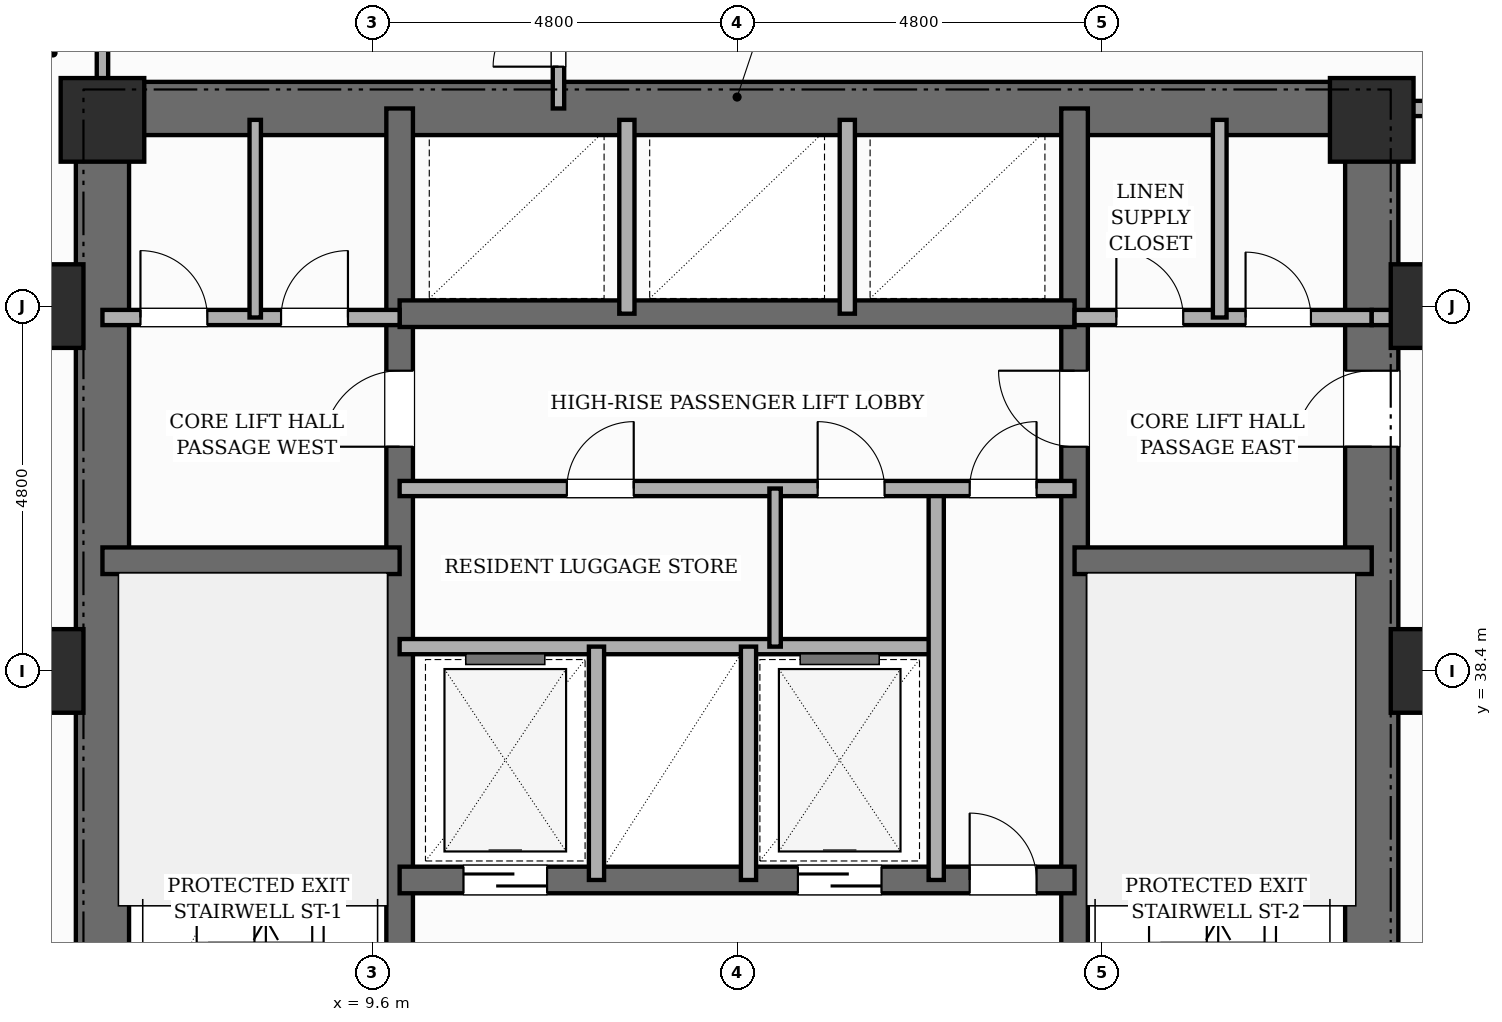
"""IFC4 building model, lengths in metres.
Left out: names, types, materials, properties, quantities, classifications, styles, units other than length and angle.
Written with IfcOpenShell. Run it as: python <this file> out.ifc"""

import sys

from ifc_helpers import new_model, si_unit, direction, frame, frame_2d, origin, origin_2d, place, context, subcontext, project, spatial, rectangle, extrude, element, fill, save


model = new_model("IFC4")
c1 = context("Model", 3, precision=1e-05, world=origin(), true_north=direction((0.0, 1.0)))
c2 = subcontext(c1, "Body", "Model", "MODEL_VIEW")
j1 = project(units=[si_unit("LENGTHUNIT", "METRE"), si_unit("PLANEANGLEUNIT", "RADIAN")], contexts=[c1])
p1 = place(None, origin())
s1 = spatial("IfcSite", under=j1, at=p1, CompositionType="ELEMENT")
p2 = place(p1, origin())
s2 = spatial("IfcBuilding", under=s1, at=p2, CompositionType="ELEMENT")
p3 = place(p2, frame((0.0, 0.0, 57.4)))
s3 = spatial("IfcBuildingStorey", under=s2, at=p3, CompositionType="ELEMENT", Elevation=57.4)
p4 = place(p3, frame((6.05, 30.55, 0.0), z_axis=(0.0, 0.0, 1.0), x_axis=(0.0, 1.0, 0.0)))
e1 = element("IfcWall", 1, at=p4, inside=s3, PredefinedType="SHEAR", context=c2, shape_type="SweptSolid", body=[
    extrude(rectangle(XDim=15.6, YDim=0.7, at=frame_2d((7.8, 0.0))), origin(), (0.0, 0.0, 1.0), 3.6),
])
p5 = place(p3, frame((22.75, 30.55, 0.0), z_axis=(0.0, 0.0, 1.0), x_axis=(0.0, 1.0, 0.0)))
e2 = element("IfcWall", 2, at=p5, inside=s3, PredefinedType="SHEAR", context=c2, shape_type="SweptSolid", body=[
    extrude(rectangle(XDim=15.6, YDim=0.7, at=frame_2d((7.8, 0.0))), origin(), (0.0, 0.0, 1.0), 3.6),
])
p6 = place(p5, frame((10.8, 0.0, 0.0)))
e3 = element("IfcOpeningElement", 3, at=p6, cuts=e2, PredefinedType="OPENING", context=c2, shape_type="SweptSolid", body=[
    extrude(rectangle(XDim=1.0, YDim=2.15, at=frame_2d((0.5, 1.075))), frame((0.0, 0.36, 0.0), z_axis=(0.0, -1.0, 0.0), x_axis=(1.0, 0.0, 0.0)), (0.0, 0.0, 1.0), 0.72),
])
p7 = place(p3, frame((6.05, 45.8, 0.0), z_axis=(0.0, 0.0, 1.0), x_axis=(1.0, 0.0, 0.0)))
e4 = element("IfcWall", 4, at=p7, inside=s3, PredefinedType="SHEAR", context=c2, shape_type="SweptSolid", body=[
    extrude(rectangle(XDim=16.7, YDim=0.7, at=frame_2d((8.35, 0.0))), origin(), (0.0, 0.0, 1.0), 3.6),
])
p8 = place(p3, frame((9.96, 30.9, 0.0), z_axis=(0.0, 0.0, 1.0), x_axis=(0.0, 1.0, 0.0)))
e5 = element("IfcWall", 5, at=p8, inside=s3, PredefinedType="SHEAR", context=c2, shape_type="SweptSolid", body=[
    extrude(rectangle(XDim=14.9, YDim=0.35, at=frame_2d((7.45, 0.0))), origin(), (0.0, 0.0, 1.0), 3.6),
])
p9 = place(p8, frame((0.65, 0.0, 0.0)))
e6 = element("IfcOpeningElement", 6, at=p9, cuts=e5, PredefinedType="OPENING", context=c2, shape_type="SweptSolid", body=[
    extrude(rectangle(XDim=0.95, YDim=2.1, at=frame_2d((0.475, 1.05))), frame((0.0, 0.185, 0.0), z_axis=(0.0, -1.0, 0.0), x_axis=(1.0, 0.0, 0.0)), (0.0, 0.0, 1.0), 0.37),
])
p10 = place(p8, frame((10.45, 0.0, 0.0)))
e7 = element("IfcOpeningElement", 7, at=p10, cuts=e5, PredefinedType="OPENING", context=c2, shape_type="SweptSolid", body=[
    extrude(rectangle(XDim=1.0, YDim=2.15, at=frame_2d((0.5, 1.075))), frame((0.0, 0.185, 0.0), z_axis=(0.0, -1.0, 0.0), x_axis=(1.0, 0.0, 0.0)), (0.0, 0.0, 1.0), 0.37),
])
p11 = place(p3, frame((18.84, 30.9, 0.0), z_axis=(0.0, 0.0, 1.0), x_axis=(0.0, 1.0, 0.0)))
e8 = element("IfcWall", 8, at=p11, inside=s3, PredefinedType="SHEAR", context=c2, shape_type="SweptSolid", body=[
    extrude(rectangle(XDim=14.9, YDim=0.35, at=frame_2d((7.45, 0.0))), origin(), (0.0, 0.0, 1.0), 3.6),
])
p12 = place(p11, frame((0.65, 0.0, 0.0)))
e9 = element("IfcOpeningElement", 9, at=p12, cuts=e8, PredefinedType="OPENING", context=c2, shape_type="SweptSolid", body=[
    extrude(rectangle(XDim=0.95, YDim=2.1, at=frame_2d((0.475, 1.05))), frame((0.0, 0.185, 0.0), z_axis=(0.0, -1.0, 0.0), x_axis=(1.0, 0.0, 0.0)), (0.0, 0.0, 1.0), 0.37),
])
p13 = place(p11, frame((10.45, 0.0, 0.0)))
e10 = element("IfcOpeningElement", 10, at=p13, cuts=e8, PredefinedType="OPENING", context=c2, shape_type="SweptSolid", body=[
    extrude(rectangle(XDim=1.0, YDim=2.15, at=frame_2d((0.5, 1.075))), frame((0.0, 0.185, 0.0), z_axis=(0.0, -1.0, 0.0), x_axis=(1.0, 0.0, 0.0)), (0.0, 0.0, 1.0), 0.37),
])
for number, where, z_axis, x_axis in (
    (11, (6.05, 39.85, 0.0), (0.0, 0.0, 1.0), (1.0, 0.0, 0.0)),
    (12, (18.84, 39.85, 0.0), (0.0, 0.0, 1.0), (1.0, 0.0, 0.0)),
):
    element("IfcWall", number, at=place(p3, frame(where, z_axis=z_axis, x_axis=x_axis)), inside=s3, PredefinedType="SHEAR", context=c2, shape_type="SweptSolid", body=[
        extrude(rectangle(XDim=3.91, YDim=0.35, at=frame_2d((1.955, 0.0))), origin(), (0.0, 0.0, 1.0), 3.6),
    ])
p14 = place(p3, frame((9.96, 35.65, 0.0), z_axis=(0.0, 0.0, 1.0), x_axis=(1.0, 0.0, 0.0)))
e13 = element("IfcWall", 13, at=p14, inside=s3, PredefinedType="SHEAR", context=c2, shape_type="SweptSolid", body=[
    extrude(rectangle(XDim=8.88, YDim=0.35, at=frame_2d((4.44, 0.0))), origin(), (0.0, 0.0, 1.0), 3.6),
])
p15 = place(p14, frame((0.84, 0.0, 0.0)))
e14 = element("IfcOpeningElement", 14, at=p15, cuts=e13, PredefinedType="OPENING", context=c2, shape_type="SweptSolid", body=[
    extrude(rectangle(XDim=1.1, YDim=2.15, at=frame_2d((0.55, 1.075))), frame((0.0, 0.185, 0.0), z_axis=(0.0, -1.0, 0.0), x_axis=(1.0, 0.0, 0.0)), (0.0, 0.0, 1.0), 0.37),
])
p16 = place(p14, frame((5.24, 0.0, 0.0)))
e15 = element("IfcOpeningElement", 15, at=p16, cuts=e13, PredefinedType="OPENING", context=c2, shape_type="SweptSolid", body=[
    extrude(rectangle(XDim=1.1, YDim=2.15, at=frame_2d((0.55, 1.075))), frame((0.0, 0.185, 0.0), z_axis=(0.0, -1.0, 0.0), x_axis=(1.0, 0.0, 0.0)), (0.0, 0.0, 1.0), 0.37),
])
p17 = place(p14, frame((7.5, 0.0, 0.0)))
e16 = element("IfcOpeningElement", 16, at=p17, cuts=e13, PredefinedType="OPENING", context=c2, shape_type="SweptSolid", body=[
    extrude(rectangle(XDim=0.88, YDim=2.1, at=frame_2d((0.44, 1.05))), frame((0.0, 0.185, 0.0), z_axis=(0.0, -1.0, 0.0), x_axis=(1.0, 0.0, 0.0)), (0.0, 0.0, 1.0), 0.37),
])
p18 = place(p3, frame((9.96, 43.1, 0.0), z_axis=(0.0, 0.0, 1.0), x_axis=(1.0, 0.0, 0.0)))
e17 = element("IfcWall", 17, at=p18, inside=s3, PredefinedType="SHEAR", context=c2, shape_type="SweptSolid", body=[
    extrude(rectangle(XDim=8.88, YDim=0.35, at=frame_2d((4.44, 0.0))), origin(), (0.0, 0.0, 1.0), 3.6),
])
for number, where, z_axis, x_axis in (
    (18, (5.25, 38.4, 0.0), (0.0, 0.0, 1.0), (1.0, 0.0, 0.0)),
    (19, (5.25, 43.2, 0.0), (0.0, 0.0, 1.0), (1.0, 0.0, 0.0)),
    (20, (6.05, 45.65, 0.0), (0.0, 0.0, 1.0), (1.0, 0.0, 0.0)),
    (21, (22.75, 45.65, 0.0), (0.0, 0.0, 1.0), (1.0, 0.0, 0.0)),
    (22, (23.55, 38.4, 0.0), (0.0, 0.0, 1.0), (1.0, 0.0, 0.0)),
    (23, (23.55, 43.2, 0.0), (0.0, 0.0, 1.0), (1.0, 0.0, 0.0)),
):
    element("IfcColumn", number, at=place(p3, frame(where, z_axis=z_axis, x_axis=x_axis)), inside=s3, PredefinedType="COLUMN", context=c2, shape_type="SweptSolid", body=[
        extrude(rectangle(XDim=1.1, YDim=1.1, at=origin_2d()), origin(), (0.0, 0.0, 1.0), 3.6),
    ])
p19 = place(p3, frame((5.03, 46.16, 0.0), z_axis=(0.0, 0.0, 1.0), x_axis=(0.382650053678, 0.92389335771, 0.0)))
e24 = element("IfcWall", 24, at=p19, inside=s3, PredefinedType="STANDARD", context=c2, shape_type="SweptSolid", body=[
    extrude(rectangle(XDim=0.626, YDim=0.32, at=frame_2d((0.313, 0.0))), origin(), (0.0, 0.0, 1.0), 3.35),
])
p20 = place(p3, frame((9.96, 38.72, 0.0), z_axis=(0.0, 0.0, 1.0), x_axis=(1.0, 0.0, 0.0)))
e25 = element("IfcWall", 25, at=p20, inside=s3, PredefinedType="POLYGONAL", context=c2, shape_type="SweptSolid", body=[
    extrude(rectangle(XDim=7.06, YDim=0.2, at=frame_2d((3.53, 0.0))), origin(), (0.0, 0.0, 1.0), 3.35),
])
for number, where, z_axis, x_axis in (
    (26, (12.55, 35.65, 0.0), (0.0, 0.0, 1.0), (0.0, 1.0, 0.0)),
    (27, (14.55, 35.65, 0.0), (0.0, 0.0, 1.0), (0.0, 1.0, 0.0)),
):
    element("IfcWall", number, at=place(p3, frame(where, z_axis=z_axis, x_axis=x_axis)), inside=s3, PredefinedType="POLYGONAL", context=c2, shape_type="SweptSolid", body=[
        extrude(rectangle(XDim=3.07, YDim=0.2, at=frame_2d((1.535, 0.0))), origin(), (0.0, 0.0, 1.0), 3.35),
    ])
p21 = place(p3, frame((17.02, 35.65, 0.0), z_axis=(0.0, 0.0, 1.0), x_axis=(0.0, 1.0, 0.0)))
e28 = element("IfcWall", 28, at=p21, inside=s3, PredefinedType="POLYGONAL", context=c2, shape_type="SweptSolid", body=[
    extrude(rectangle(XDim=5.15, YDim=0.2, at=frame_2d((2.575, 0.0))), origin(), (0.0, 0.0, 1.0), 3.35),
])
p22 = place(p3, frame((9.96, 40.8, 0.0), z_axis=(0.0, 0.0, 1.0), x_axis=(1.0, 0.0, 0.0)))
e29 = element("IfcWall", 29, at=p22, inside=s3, PredefinedType="POLYGONAL", context=c2, shape_type="SweptSolid", body=[
    extrude(rectangle(XDim=8.88, YDim=0.2, at=frame_2d((4.44, 0.0))), origin(), (0.0, 0.0, 1.0), 3.35),
])
p23 = place(p22, frame((7.5, 0.0, 0.0)))
e30 = element("IfcOpeningElement", 30, at=p23, cuts=e29, PredefinedType="OPENING", context=c2, shape_type="SweptSolid", body=[
    extrude(rectangle(XDim=0.88, YDim=2.1, at=frame_2d((0.44, 1.05))), frame((0.0, 0.11, 0.0), z_axis=(0.0, -1.0, 0.0), x_axis=(1.0, 0.0, 0.0)), (0.0, 0.0, 1.0), 0.22),
])
p24 = place(p22, frame((2.2, 0.0, 0.0)))
e31 = element("IfcOpeningElement", 31, at=p24, cuts=e29, PredefinedType="OPENING", context=c2, shape_type="SweptSolid", body=[
    extrude(rectangle(XDim=0.88, YDim=2.1, at=frame_2d((0.44, 1.05))), frame((0.0, 0.11, 0.0), z_axis=(0.0, -1.0, 0.0), x_axis=(1.0, 0.0, 0.0)), (0.0, 0.0, 1.0), 0.22),
])
p25 = place(p22, frame((5.5, 0.0, 0.0)))
e32 = element("IfcOpeningElement", 32, at=p25, cuts=e29, PredefinedType="OPENING", context=c2, shape_type="SweptSolid", body=[
    extrude(rectangle(XDim=0.88, YDim=2.1, at=frame_2d((0.44, 1.05))), frame((0.0, 0.11, 0.0), z_axis=(0.0, -1.0, 0.0), x_axis=(1.0, 0.0, 0.0)), (0.0, 0.0, 1.0), 0.22),
])
p26 = place(p3, frame((18.84, 43.05, 0.0), z_axis=(0.0, 0.0, 1.0), x_axis=(1.0, 0.0, 0.0)))
e33 = element("IfcWall", 33, at=p26, inside=s3, PredefinedType="POLYGONAL", context=c2, shape_type="SweptSolid", body=[
    extrude(rectangle(XDim=3.91, YDim=0.2, at=frame_2d((1.955, 0.0))), origin(), (0.0, 0.0, 1.0), 2.53),
])
p27 = place(p26, frame((0.55, 0.0, 0.0)))
e34 = element("IfcOpeningElement", 34, at=p27, cuts=e33, PredefinedType="OPENING", context=c2, shape_type="SweptSolid", body=[
    extrude(rectangle(XDim=0.88, YDim=2.1, at=frame_2d((0.44, 1.05))), frame((0.0, 0.11, 0.0), z_axis=(0.0, -1.0, 0.0), x_axis=(1.0, 0.0, 0.0)), (0.0, 0.0, 1.0), 0.22),
])
p28 = place(p26, frame((2.25, 0.0, 0.0)))
e35 = element("IfcOpeningElement", 35, at=p28, cuts=e33, PredefinedType="OPENING", context=c2, shape_type="SweptSolid", body=[
    extrude(rectangle(XDim=0.86, YDim=2.1, at=frame_2d((0.43, 1.05))), frame((0.0, 0.11, 0.0), z_axis=(0.0, -1.0, 0.0), x_axis=(1.0, 0.0, 0.0)), (0.0, 0.0, 1.0), 0.22),
])
p29 = place(p3, frame((6.05, 43.05, 0.0), z_axis=(0.0, 0.0, 1.0), x_axis=(1.0, 0.0, 0.0)))
e36 = element("IfcWall", 36, at=p29, inside=s3, PredefinedType="POLYGONAL", context=c2, shape_type="SweptSolid", body=[
    extrude(rectangle(XDim=3.91, YDim=0.2, at=frame_2d((1.955, 0.0))), origin(), (0.0, 0.0, 1.0), 2.53),
])
p30 = place(p29, frame((0.5, 0.0, 0.0)))
e37 = element("IfcOpeningElement", 37, at=p30, cuts=e36, PredefinedType="OPENING", context=c2, shape_type="SweptSolid", body=[
    extrude(rectangle(XDim=0.88, YDim=2.1, at=frame_2d((0.44, 1.05))), frame((0.0, 0.11, 0.0), z_axis=(0.0, -1.0, 0.0), x_axis=(1.0, 0.0, 0.0)), (0.0, 0.0, 1.0), 0.22),
])
p31 = place(p29, frame((2.35, 0.0, 0.0)))
e38 = element("IfcOpeningElement", 38, at=p31, cuts=e36, PredefinedType="OPENING", context=c2, shape_type="SweptSolid", body=[
    extrude(rectangle(XDim=0.88, YDim=2.1, at=frame_2d((0.44, 1.05))), frame((0.0, 0.11, 0.0), z_axis=(0.0, -1.0, 0.0), x_axis=(1.0, 0.0, 0.0)), (0.0, 0.0, 1.0), 0.22),
])
for number, where, z_axis, x_axis in (
    (39, (12.95, 43.1, 0.0), (0.0, 0.0, 1.0), (0.0, 1.0, 0.0)),
    (40, (15.85, 43.1, 0.0), (0.0, 0.0, 1.0), (0.0, 1.0, 0.0)),
):
    element("IfcWall", number, at=place(p3, frame(where, z_axis=z_axis, x_axis=x_axis)), inside=s3, PredefinedType="POLYGONAL", context=c2, shape_type="SweptSolid", body=[
        extrude(rectangle(XDim=2.55, YDim=0.2, at=frame_2d((1.275, 0.0))), origin(), (0.0, 0.0, 1.0), 3.35),
    ])
p32 = place(p3, frame((8.06, 43.05, 0.0), z_axis=(0.0, 0.0, 1.0), x_axis=(0.0, 1.0, 0.0)))
e41 = element("IfcWall", 41, at=p32, inside=s3, PredefinedType="PARTITIONING", context=c2, shape_type="SweptSolid", body=[
    extrude(rectangle(XDim=2.6, YDim=0.15, at=frame_2d((1.3, 0.0))), origin(), (0.0, 0.0, 1.0), 3.35),
])
p33 = place(p3, frame((14.9, 38.72, 0.0), z_axis=(0.0, 0.0, 1.0), x_axis=(0.0, 1.0, 0.0)))
e42 = element("IfcWall", 42, at=p33, inside=s3, PredefinedType="PARTITIONING", context=c2, shape_type="SweptSolid", body=[
    extrude(rectangle(XDim=2.08, YDim=0.15, at=frame_2d((1.04, 0.0))), origin(), (0.0, 0.0, 1.0), 3.35),
])
p34 = place(p3, frame((20.75, 43.05, 0.0), z_axis=(0.0, 0.0, 1.0), x_axis=(0.0, 1.0, 0.0)))
e43 = element("IfcWall", 43, at=p34, inside=s3, PredefinedType="PLUMBINGWALL", context=c2, shape_type="SweptSolid", body=[
    extrude(rectangle(XDim=2.6, YDim=0.18, at=frame_2d((1.3, 0.0))), origin(), (0.0, 0.0, 1.0), 3.35),
])
p35 = place(p3, frame((22.75, 45.8, 0.0), z_axis=(0.0, 0.0, 1.0), x_axis=(1.0, 0.0, 0.0)))
e44 = element("IfcWall", 44, at=p35, inside=s3, PredefinedType="PARTITIONING", context=c2, shape_type="SweptSolid", body=[
    extrude(rectangle(XDim=2.75, YDim=0.2, at=frame_2d((1.375, 0.0))), origin(), (0.0, 0.0, 1.0), 3.35),
])
p36 = place(p3, frame((6.05, 45.8, 0.0), z_axis=(0.0, 0.0, 1.0), x_axis=(0.0, 1.0, 0.0)))
e45 = element("IfcWall", 45, at=p36, inside=s3, PredefinedType="PARTITIONING", context=c2, shape_type="SweptSolid", body=[
    extrude(rectangle(XDim=1.46, YDim=0.15, at=frame_2d((0.73, 0.0))), origin(), (0.0, 0.0, 1.0), 3.35),
])
p37 = place(p3, frame((12.05, 45.8, 0.0), z_axis=(0.0, 0.0, 1.0), x_axis=(0.0, 1.0, 0.0)))
e46 = element("IfcWall", 46, at=p37, inside=s3, PredefinedType="PARTITIONING", context=c2, shape_type="SweptSolid", body=[
    extrude(rectangle(XDim=1.88, YDim=0.15, at=frame_2d((0.94, 0.0))), origin(), (0.0, 0.0, 1.0), 3.35),
])
p38 = place(p37, frame((0.55, 0.0, 0.0)))
e47 = element("IfcOpeningElement", 47, at=p38, cuts=e46, PredefinedType="OPENING", context=c2, shape_type="SweptSolid", body=[
    extrude(rectangle(XDim=0.86, YDim=2.1, at=frame_2d((0.43, 1.05))), frame((0.0, 0.085, 0.0), z_axis=(0.0, -1.0, 0.0), x_axis=(1.0, 0.0, 0.0)), (0.0, 0.0, 1.0), 0.17),
])
p39 = place(p3, frame((22.75, 43.05, 0.0), z_axis=(0.0, 0.0, 1.0), x_axis=(1.0, 0.0, 0.0)))
e48 = element("IfcWall", 48, at=p39, inside=s3, PredefinedType="PARTITIONING", context=c2, shape_type="SweptSolid", body=[
    extrude(rectangle(XDim=2.75, YDim=0.2, at=frame_2d((1.375, 0.0))), origin(), (0.0, 0.0, 1.0), 2.53),
])
p40 = place(p15, origin())
e49 = element("IfcDoor", 49, at=p40, inside=s3, OperationType="SLIDING_TO_LEFT", PredefinedType="DOOR", context=c2, shape_type="SweptSolid", body=[
    extrude(rectangle(XDim=1.1, YDim=2.15, at=frame_2d((0.55, 1.075))), frame((0.0, 0.025, 0.0), z_axis=(0.0, -1.0, 0.0), x_axis=(1.0, 0.0, 0.0)), (0.0, 0.0, 1.0), 0.05),
])
fill(e14, e49)
p41 = place(p16, origin())
e50 = element("IfcDoor", 50, at=p41, inside=s3, OperationType="SLIDING_TO_RIGHT", PredefinedType="DOOR", context=c2, shape_type="SweptSolid", body=[
    extrude(rectangle(XDim=1.1, YDim=2.15, at=frame_2d((0.55, 1.075))), frame((0.0, 0.025, 0.0), z_axis=(0.0, -1.0, 0.0), x_axis=(1.0, 0.0, 0.0)), (0.0, 0.0, 1.0), 0.05),
])
fill(e15, e50)
p42 = place(p17, origin())
e51 = element("IfcDoor", 51, at=p42, inside=s3, OperationType="SINGLE_SWING_LEFT", PredefinedType="DOOR", context=c2, shape_type="SweptSolid", body=[
    extrude(rectangle(XDim=0.88, YDim=2.1, at=frame_2d((0.44, 1.05))), frame((0.0, 0.025, 0.0), z_axis=(0.0, -1.0, 0.0), x_axis=(1.0, 0.0, 0.0)), (0.0, 0.0, 1.0), 0.05),
])
fill(e16, e51)
p43 = place(p23, origin())
e52 = element("IfcDoor", 52, at=p43, inside=s3, OperationType="SINGLE_SWING_RIGHT", PredefinedType="DOOR", context=c2, shape_type="SweptSolid", body=[
    extrude(rectangle(XDim=0.88, YDim=2.1, at=frame_2d((0.44, 1.05))), frame((0.0, 0.025, 0.0), z_axis=(0.0, -1.0, 0.0), x_axis=(1.0, 0.0, 0.0)), (0.0, 0.0, 1.0), 0.05),
])
fill(e30, e52)
p44 = place(p10, origin())
e53 = element("IfcDoor", 53, at=p44, inside=s3, OperationType="SINGLE_SWING_LEFT", PredefinedType="DOOR", context=c2, shape_type="SweptSolid", body=[
    extrude(rectangle(XDim=1.0, YDim=2.15, at=frame_2d((0.5, 1.075))), frame((0.0, 0.025, 0.0), z_axis=(0.0, -1.0, 0.0), x_axis=(1.0, 0.0, 0.0)), (0.0, 0.0, 1.0), 0.05),
])
fill(e7, e53)
p45 = place(p13, origin())
e54 = element("IfcDoor", 54, at=p45, inside=s3, OperationType="SINGLE_SWING_RIGHT", PredefinedType="DOOR", context=c2, shape_type="SweptSolid", body=[
    extrude(rectangle(XDim=1.0, YDim=2.15, at=frame_2d((0.5, 1.075))), frame((0.0, 0.025, 0.0), z_axis=(0.0, -1.0, 0.0), x_axis=(1.0, 0.0, 0.0)), (0.0, 0.0, 1.0), 0.05),
])
fill(e10, e54)
p46 = place(p6, origin())
e55 = element("IfcDoor", 55, at=p46, inside=s3, OperationType="SINGLE_SWING_LEFT", PredefinedType="DOOR", context=c2, shape_type="SweptSolid", body=[
    extrude(rectangle(XDim=1.0, YDim=2.15, at=frame_2d((0.5, 1.075))), frame((0.0, 0.025, 0.0), z_axis=(0.0, -1.0, 0.0), x_axis=(1.0, 0.0, 0.0)), (0.0, 0.0, 1.0), 0.05),
])
fill(e3, e55)
p47 = place(p30, origin())
e56 = element("IfcDoor", 56, at=p47, inside=s3, OperationType="SINGLE_SWING_LEFT", PredefinedType="DOOR", context=c2, shape_type="SweptSolid", body=[
    extrude(rectangle(XDim=0.88, YDim=2.1, at=frame_2d((0.44, 1.05))), frame((0.0, 0.025, 0.0), z_axis=(0.0, -1.0, 0.0), x_axis=(1.0, 0.0, 0.0)), (0.0, 0.0, 1.0), 0.05),
])
fill(e37, e56)
p48 = place(p31, origin())
e57 = element("IfcDoor", 57, at=p48, inside=s3, OperationType="SINGLE_SWING_RIGHT", PredefinedType="DOOR", context=c2, shape_type="SweptSolid", body=[
    extrude(rectangle(XDim=0.88, YDim=2.1, at=frame_2d((0.44, 1.05))), frame((0.0, 0.025, 0.0), z_axis=(0.0, -1.0, 0.0), x_axis=(1.0, 0.0, 0.0)), (0.0, 0.0, 1.0), 0.05),
])
fill(e38, e57)
p49 = place(p24, origin())
e58 = element("IfcDoor", 58, at=p49, inside=s3, OperationType="SINGLE_SWING_RIGHT", PredefinedType="DOOR", context=c2, shape_type="SweptSolid", body=[
    extrude(rectangle(XDim=0.88, YDim=2.1, at=frame_2d((0.44, 1.05))), frame((0.0, 0.025, 0.0), z_axis=(0.0, -1.0, 0.0), x_axis=(1.0, 0.0, 0.0)), (0.0, 0.0, 1.0), 0.05),
])
fill(e31, e58)
p50 = place(p25, origin())
e59 = element("IfcDoor", 59, at=p50, inside=s3, OperationType="SINGLE_SWING_LEFT", PredefinedType="DOOR", context=c2, shape_type="SweptSolid", body=[
    extrude(rectangle(XDim=0.88, YDim=2.1, at=frame_2d((0.44, 1.05))), frame((0.0, 0.025, 0.0), z_axis=(0.0, -1.0, 0.0), x_axis=(1.0, 0.0, 0.0)), (0.0, 0.0, 1.0), 0.05),
])
fill(e32, e59)
p51 = place(p27, origin())
e60 = element("IfcDoor", 60, at=p51, inside=s3, OperationType="SINGLE_SWING_LEFT", PredefinedType="DOOR", context=c2, shape_type="SweptSolid", body=[
    extrude(rectangle(XDim=0.88, YDim=2.1, at=frame_2d((0.44, 1.05))), frame((0.0, 0.025, 0.0), z_axis=(0.0, -1.0, 0.0), x_axis=(1.0, 0.0, 0.0)), (0.0, 0.0, 1.0), 0.05),
])
fill(e34, e60)
p52 = place(p28, origin())
e61 = element("IfcDoor", 61, at=p52, inside=s3, OperationType="SINGLE_SWING_LEFT", PredefinedType="DOOR", context=c2, shape_type="SweptSolid", body=[
    extrude(rectangle(XDim=0.86, YDim=2.1, at=frame_2d((0.43, 1.05))), frame((0.0, 0.025, 0.0), z_axis=(0.0, -1.0, 0.0), x_axis=(1.0, 0.0, 0.0)), (0.0, 0.0, 1.0), 0.05),
])
fill(e35, e61)
p53 = place(p38, origin())
e62 = element("IfcDoor", 62, at=p53, inside=s3, OperationType="SINGLE_SWING_LEFT", PredefinedType="DOOR", context=c2, shape_type="SweptSolid", body=[
    extrude(rectangle(XDim=0.86, YDim=2.1, at=frame_2d((0.43, 1.05))), frame((0.0, 0.025, 0.0), z_axis=(0.0, -1.0, 0.0), x_axis=(1.0, 0.0, 0.0)), (0.0, 0.0, 1.0), 0.05),
])
fill(e47, e62)
save(model, sys.argv[1])
